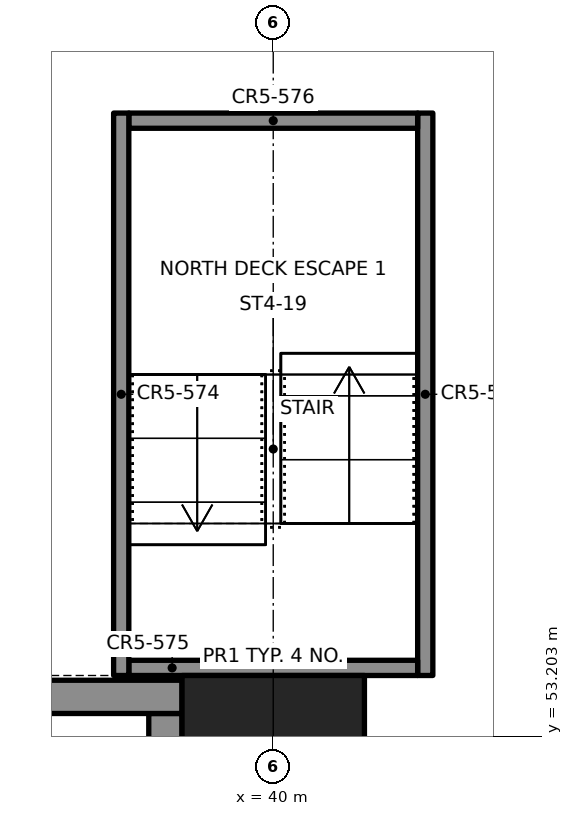
"""IFC4 building model, lengths in metres.
Left out: names, types, materials, properties, quantities, classifications, styles, units other than length and angle.
Written with IfcOpenShell. Run it as: python <this file> out.ifc"""

import sys

from ifc_helpers import new_model, si_unit, direction, frame, frame_2d, origin, origin_2d, place, context, subcontext, project, spatial, rectangle, extrude, element, save


model = new_model("IFC4")
c1 = context("Model", 3, precision=1e-05, world=origin(), true_north=direction((0.0, 1.0)))
c2 = subcontext(c1, "Body", "Model", "MODEL_VIEW")
j1 = project(units=[si_unit("LENGTHUNIT", "METRE"), si_unit("PLANEANGLEUNIT", "RADIAN")], contexts=[c1])
p1 = place(None, origin())
s1 = spatial("IfcSite", under=j1, at=p1, CompositionType="ELEMENT")
p2 = place(p1, origin())
s2 = spatial("IfcBuilding", under=s1, at=p2, CompositionType="ELEMENT")
p3 = place(p2, frame((0.0, 0.0, 8.8)))
s3 = spatial("IfcBuildingStorey", under=s2, at=p3, CompositionType="ELEMENT", Elevation=8.8)
p4 = place(p3, frame((40.0, 52.8, 0.0), z_axis=(0.0, 0.0, 1.0), x_axis=(1.0, 0.0, 0.0)))
e1 = element("IfcColumn", 1, at=p4, inside=s3, PredefinedType="COLUMN", context=c2, shape_type="SweptSolid", body=[
    extrude(rectangle(XDim=2.4, YDim=2.4, at=origin_2d()), origin(), (0.0, 0.0, 1.0), 3.65),
])
p5 = place(p3, frame((30.4, 53.719, 0.0), z_axis=(0.0, 0.0, 1.0), x_axis=(1.0, 0.0, 0.0)))
e2 = element("IfcWall", 2, at=p5, inside=s3, PredefinedType="SOLIDWALL", context=c2, shape_type="SweptSolid", body=[
    extrude(rectangle(XDim=8.4, YDim=0.438, at=frame_2d((4.2, 0.0))), origin(), (0.0, 0.0, 1.0), 5.2),
])
p6 = place(p5, frame((4.5, 0.0, 0.8)))
e3 = element("IfcOpeningElement", 3, at=p6, cuts=e2, PredefinedType="OPENING", context=c2, shape_type="SweptSolid", body=[
    extrude(rectangle(XDim=1.8, YDim=3.6, at=frame_2d((0.9, 1.8))), frame((0.0, 0.229, 0.0), z_axis=(0.0, -1.0, 0.0), x_axis=(1.0, 0.0, 0.0)), (0.0, 0.0, 1.0), 0.458),
])
p7 = place(p3, frame((38.581, 18.5, 0.0), z_axis=(0.0, 0.0, 1.0), x_axis=(0.0, 1.0, 0.0)))
e4 = element("IfcWall", 4, at=p7, inside=s3, PredefinedType="SOLIDWALL", context=c2, shape_type="SweptSolid", body=[
    extrude(rectangle(XDim=35.0, YDim=0.438, at=frame_2d((17.5, 0.0))), origin(), (0.0, 0.0, 1.0), 5.2),
])
p8 = place(p7, frame((4.0, 0.0, 1.1)))
e5 = element("IfcOpeningElement", 5, at=p8, cuts=e4, PredefinedType="OPENING", context=c2, shape_type="SweptSolid", body=[
    extrude(rectangle(XDim=1.8, YDim=2.8, at=frame_2d((0.9, 1.4))), frame((0.0, 0.229, 0.0), z_axis=(0.0, -1.0, 0.0), x_axis=(1.0, 0.0, 0.0)), (0.0, 0.0, 1.0), 0.458),
])
p9 = place(p7, frame((12.4, 0.0, 1.1)))
e6 = element("IfcOpeningElement", 6, at=p9, cuts=e4, PredefinedType="OPENING", context=c2, shape_type="SweptSolid", body=[
    extrude(rectangle(XDim=1.8, YDim=2.8, at=frame_2d((0.9, 1.4))), frame((0.0, 0.229, 0.0), z_axis=(0.0, -1.0, 0.0), x_axis=(1.0, 0.0, 0.0)), (0.0, 0.0, 1.0), 0.458),
])
p10 = place(p7, frame((20.8, 0.0, 1.1)))
e7 = element("IfcOpeningElement", 7, at=p10, cuts=e4, PredefinedType="OPENING", context=c2, shape_type="SweptSolid", body=[
    extrude(rectangle(XDim=1.8, YDim=2.8, at=frame_2d((0.9, 1.4))), frame((0.0, 0.229, 0.0), z_axis=(0.0, -1.0, 0.0), x_axis=(1.0, 0.0, 0.0)), (0.0, 0.0, 1.0), 0.458),
])
p11 = place(p7, frame((29.2, 0.0, 1.1)))
e8 = element("IfcOpeningElement", 8, at=p11, cuts=e4, PredefinedType="OPENING", context=c2, shape_type="SweptSolid", body=[
    extrude(rectangle(XDim=1.8, YDim=2.8, at=frame_2d((0.9, 1.4))), frame((0.0, 0.229, 0.0), z_axis=(0.0, -1.0, 0.0), x_axis=(1.0, 0.0, 0.0)), (0.0, 0.0, 1.0), 0.458),
])
for number, where, z_axis, x_axis in (
    (9, (38.0, 54.0, 0.0), (0.0, 0.0, 1.0), (0.0, 1.0, 0.0)),
    (10, (42.0, 61.4, 0.0), (0.0, 0.0, 1.0), (0.0, -1.0, 0.0)),
):
    element("IfcWall", number, at=place(p3, frame(where, z_axis=z_axis, x_axis=x_axis)), inside=s3, PredefinedType="SOLIDWALL", context=c2, shape_type="SweptSolid", body=[
        extrude(rectangle(XDim=7.4, YDim=0.2, at=frame_2d((3.7, 0.0))), origin(), (0.0, 0.0, 1.0), 5.2),
    ])
for number, where, z_axis, x_axis in (
    (11, (38.1, 54.1, 0.0), (0.0, 0.0, 1.0), (1.0, 0.0, 0.0)),
    (12, (38.1, 61.3, 0.0), (0.0, 0.0, 1.0), (1.0, 0.0, 0.0)),
):
    element("IfcWall", number, at=place(p3, frame(where, z_axis=z_axis, x_axis=x_axis)), inside=s3, PredefinedType="SOLIDWALL", context=c2, shape_type="SweptSolid", body=[
        extrude(rectangle(XDim=3.8, YDim=0.2, at=frame_2d((1.9, 0.0))), origin(), (0.0, 0.0, 1.0), 5.2),
    ])
save(model, sys.argv[1])
